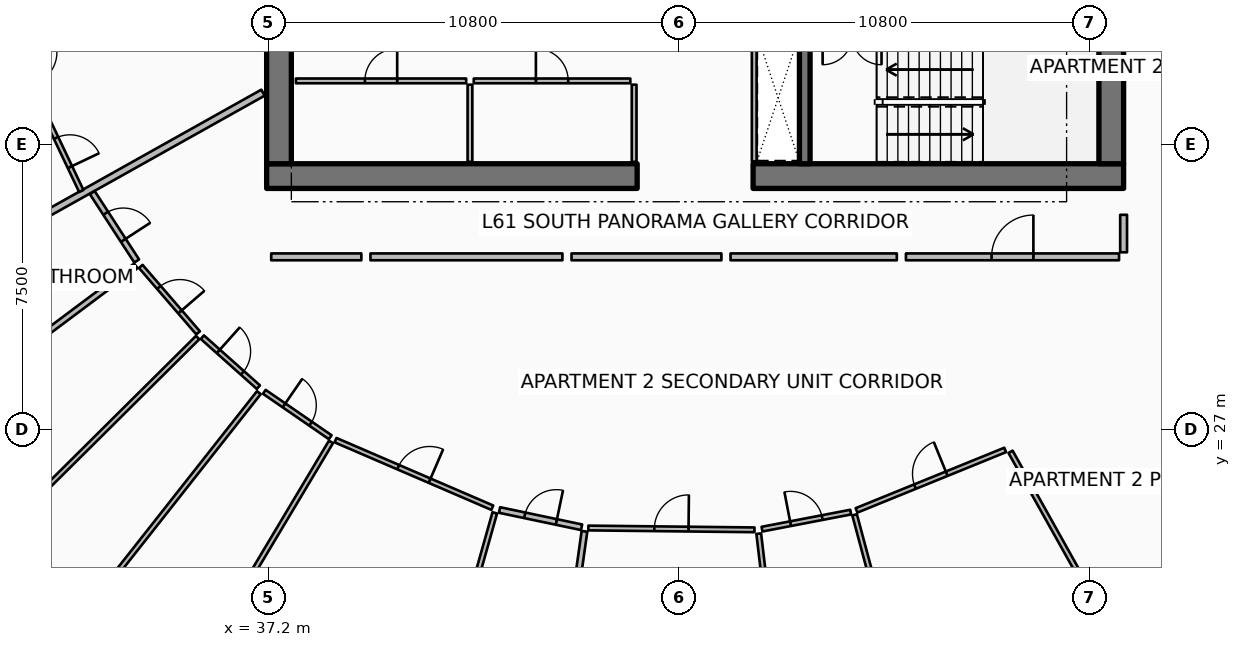
"""IFC4 building model, lengths in metres.
Left out: names, types, materials, properties, quantities, classifications, styles, units other than length and angle.
Written with IfcOpenShell. Run it as: python <this file> out.ifc"""

import sys

from ifc_helpers import new_model, si_unit, direction, frame, frame_2d, origin, place, context, subcontext, project, spatial, rectangle, extrude, element, fill, save


model = new_model("IFC4")
c1 = context("Model", 3, precision=1e-05, world=origin(), true_north=direction((0.0, 1.0)))
c2 = subcontext(c1, "Body", "Model", "MODEL_VIEW")
j1 = project(units=[si_unit("LENGTHUNIT", "METRE"), si_unit("PLANEANGLEUNIT", "RADIAN")], contexts=[c1])
p1 = place(None, origin())
s1 = spatial("IfcSite", under=j1, at=p1, CompositionType="ELEMENT")
p2 = place(p1, origin())
s2 = spatial("IfcBuilding", under=s1, at=p2, CompositionType="ELEMENT")
p3 = place(p2, frame((0.0, 0.0, 244.4)))
s3 = spatial("IfcBuildingStorey", under=s2, at=p3, CompositionType="ELEMENT", Elevation=244.4)
for number, where, z_axis, x_axis in (
    (1, (37.15, 33.675, 0.0), (0.0, 0.0, 1.0), (1.0, 0.0, 0.0)),
    (2, (49.95, 33.675, 0.0), (0.0, 0.0, 1.0), (1.0, 0.0, 0.0)),
):
    element("IfcWall", number, at=place(p3, frame(where, z_axis=z_axis, x_axis=x_axis)), inside=s3, PredefinedType="SHEAR", context=c2, shape_type="SweptSolid", body=[
        extrude(rectangle(XDim=9.75, YDim=0.65, at=frame_2d((4.875, 0.0))), origin(), (0.0, 0.0, 1.0), 3.85),
    ])
for number, where, z_axis, x_axis in (
    (3, (37.475, 34.0, 0.0), (0.0, 0.0, 1.0), (0.0, 1.0, 0.0)),
    (4, (59.375, 34.0, 0.0), (0.0, 0.0, 1.0), (0.0, 1.0, 0.0)),
):
    element("IfcWall", number, at=place(p3, frame(where, z_axis=z_axis, x_axis=x_axis)), inside=s3, PredefinedType="SHEAR", context=c2, shape_type="SweptSolid", body=[
        extrude(rectangle(XDim=16.0, YDim=0.65, at=frame_2d((8.0, 0.0))), origin(), (0.0, 0.0, 1.0), 3.85),
    ])
p4 = place(p3, frame((51.31, 34.0, 0.0), z_axis=(0.0, 0.0, 1.0), x_axis=(0.0, 1.0, 0.0)))
e5 = element("IfcWall", 5, at=p4, inside=s3, PredefinedType="SHEAR", context=c2, shape_type="SweptSolid", body=[
    extrude(rectangle(XDim=3.5, YDim=0.28, at=frame_2d((1.75, 0.0))), origin(), (0.0, 0.0, 1.0), 3.85),
])
for number, where, z_axis, x_axis in (
    (6, (46.82, 34.05, 0.0), (0.0, 0.0, 1.0), (0.0, 1.0, 0.0)),
    (7, (42.5, 34.05, 0.0), (0.0, 0.0, 1.0), (0.0, 1.0, 0.0)),
):
    element("IfcWall", number, at=place(p3, frame(where, z_axis=z_axis, x_axis=x_axis)), inside=s3, PredefinedType="PARTITIONING", context=c2, shape_type="SweptSolid", body=[
        extrude(rectangle(XDim=2.03, YDim=0.125, at=frame_2d((1.015, 0.0))), origin(), (0.0, 0.0, 1.0), 3.03),
    ])
p5 = place(p3, frame((37.92, 36.18, 0.0), z_axis=(0.0, 0.0, 1.0), x_axis=(1.0, 0.0, 0.0)))
e8 = element("IfcWall", 8, at=p5, inside=s3, PredefinedType="PARTITIONING", context=c2, shape_type="SweptSolid", body=[
    extrude(rectangle(XDim=4.48, YDim=0.125, at=frame_2d((2.24, 0.0))), origin(), (0.0, 0.0, 1.0), 3.03),
])
p6 = place(p5, frame((1.815, 0.0, 0.0)))
e9 = element("IfcOpeningElement", 9, at=p6, cuts=e8, PredefinedType="OPENING", context=c2, shape_type="SweptSolid", body=[
    extrude(rectangle(XDim=0.85, YDim=2.06, at=frame_2d((0.425, 1.03))), frame((0.0, 0.073, 0.0), z_axis=(0.0, -1.0, 0.0), x_axis=(1.0, 0.0, 0.0)), (0.0, 0.0, 1.0), 0.145),
])
p7 = place(p3, frame((42.6, 36.18, 0.0), z_axis=(0.0, 0.0, 1.0), x_axis=(1.0, 0.0, 0.0)))
e10 = element("IfcWall", 10, at=p7, inside=s3, PredefinedType="PARTITIONING", context=c2, shape_type="SweptSolid", body=[
    extrude(rectangle(XDim=4.12, YDim=0.125, at=frame_2d((2.06, 0.0))), origin(), (0.0, 0.0, 1.0), 3.03),
])
p8 = place(p7, frame((1.635, 0.0, 0.0)))
e11 = element("IfcOpeningElement", 11, at=p8, cuts=e10, PredefinedType="OPENING", context=c2, shape_type="SweptSolid", body=[
    extrude(rectangle(XDim=0.85, YDim=2.06, at=frame_2d((0.425, 1.03))), frame((0.0, 0.073, 0.0), z_axis=(0.0, -1.0, 0.0), x_axis=(1.0, 0.0, 0.0)), (0.0, 0.0, 1.0), 0.145),
])
p9 = place(p3, frame((49.98, 34.06, 0.0), z_axis=(0.0, 0.0, 1.0), x_axis=(0.0, 1.0, 0.0)))
e12 = element("IfcWall", 12, at=p9, inside=s3, PredefinedType="PARTITIONING", context=c2, shape_type="SweptSolid", body=[
    extrude(rectangle(XDim=3.4, YDim=0.125, at=frame_2d((1.7, 0.0))), origin(), (0.0, 0.0, 1.0), 3.03),
])
p10 = place(p3, frame((37.054, 35.87, 0.0), z_axis=(0.0, 0.0, 1.0), x_axis=(-0.872490186067, -0.488631635506, 0.0)))
e13 = element("IfcWall", 13, at=p10, inside=s3, PredefinedType="PARTITIONING", context=c2, shape_type="SweptSolid", body=[
    extrude(rectangle(XDim=17.884, YDim=0.18, at=frame_2d((8.942, 0.0))), origin(), (0.0, 0.0, 1.0), 2.957),
])
p11 = place(p3, frame((31.31, 35.306, 0.0), z_axis=(0.0, 0.0, 1.0), x_axis=(0.429468098594, -0.903082029657, 0.0)))
e14 = element("IfcWall", 14, at=p11, inside=s3, PredefinedType="PARTITIONING", context=c2, shape_type="SweptSolid", body=[
    extrude(rectangle(XDim=2.24, YDim=0.125, at=frame_2d((1.12, 0.0))), origin(), (0.0, 0.0, 1.0), 2.957),
])
p12 = place(p11, frame((0.695, 0.0, 0.0)))
e15 = element("IfcOpeningElement", 15, at=p12, cuts=e14, PredefinedType="OPENING", context=c2, shape_type="SweptSolid", body=[
    extrude(rectangle(XDim=0.85, YDim=2.06, at=frame_2d((0.425, 1.03))), frame((0.0, 0.073, 0.0), z_axis=(0.0, -1.0, 0.0), x_axis=(1.0, 0.0, 0.0)), (0.0, 0.0, 1.0), 0.145),
])
p13 = place(p3, frame((53.972, 31.55, 0.0), z_axis=(0.0, 0.0, 1.0), x_axis=(1.0, 0.0, 0.0)))
e16 = element("IfcWall", 16, at=p13, inside=s3, PredefinedType="PARTITIONING", context=c2, shape_type="SweptSolid", body=[
    extrude(rectangle(XDim=5.608, YDim=0.18, at=frame_2d((2.804, 0.0))), origin(), (0.0, 0.0, 1.0), 2.957),
])
p14 = place(p13, frame((2.254, 0.0, 0.0)))
e17 = element("IfcOpeningElement", 17, at=p14, cuts=e16, PredefinedType="OPENING", context=c2, shape_type="SweptSolid", body=[
    extrude(rectangle(XDim=1.1, YDim=2.1, at=frame_2d((0.55, 1.05))), frame((0.0, 0.1, 0.0), z_axis=(0.0, -1.0, 0.0), x_axis=(1.0, 0.0, 0.0)), (0.0, 0.0, 1.0), 0.2),
])
p15 = place(p3, frame((59.7, 31.67, 0.0), z_axis=(0.0, 0.0, 1.0), x_axis=(0.0, 1.0, 0.0)))
e18 = element("IfcWall", 18, at=p15, inside=s3, PredefinedType="PARTITIONING", context=c2, shape_type="SweptSolid", body=[
    extrude(rectangle(XDim=0.987, YDim=0.18, at=frame_2d((0.493, 0.0))), origin(), (0.0, 0.0, 1.0), 2.957),
])
p16 = place(p3, frame((37.27, 31.55, 0.0), z_axis=(0.0, 0.0, 1.0), x_axis=(1.0, 0.0, 0.0)))
e19 = element("IfcWall", 19, at=p16, inside=s3, PredefinedType="PARTITIONING", context=c2, shape_type="SweptSolid", body=[
    extrude(rectangle(XDim=2.372, YDim=0.18, at=frame_2d((1.186, 0.0))), origin(), (0.0, 0.0, 1.0), 2.957),
])
p17 = place(p3, frame((32.562, 33.24, 0.0), z_axis=(0.0, 0.0, 1.0), x_axis=(0.544888302375, -0.838508639154, 0.0)))
e20 = element("IfcWall", 20, at=p17, inside=s3, PredefinedType="PARTITIONING", context=c2, shape_type="SweptSolid", body=[
    extrude(rectangle(XDim=2.144, YDim=0.15, at=frame_2d((1.072, 0.0))), origin(), (0.0, 0.0, 1.0), 2.957),
])
p18 = place(p17, frame((0.647, 0.0, 0.0)))
e21 = element("IfcOpeningElement", 21, at=p18, cuts=e20, PredefinedType="OPENING", context=c2, shape_type="SweptSolid", body=[
    extrude(rectangle(XDim=0.85, YDim=2.06, at=frame_2d((0.425, 1.03))), frame((0.0, 0.085, 0.0), z_axis=(0.0, -1.0, 0.0), x_axis=(1.0, 0.0, 0.0)), (0.0, 0.0, 1.0), 0.17),
])
p19 = place(p3, frame((33.707, 31.312, 0.0), z_axis=(0.0, 0.0, 1.0), x_axis=(-0.800889069655, -0.598812740435, 0.0)))
e22 = element("IfcWall", 22, at=p19, inside=s3, PredefinedType="PARTITIONING", context=c2, shape_type="SweptSolid", body=[
    extrude(rectangle(XDim=3.72, YDim=0.15, at=frame_2d((1.86, 0.0))), origin(), (0.0, 0.0, 1.0), 3.03),
])
p20 = place(p3, frame((35.335, 29.426, 0.0), z_axis=(0.0, 0.0, 1.0), x_axis=(-0.709660425086, -0.704543881576, 0.0)))
e23 = element("IfcWall", 23, at=p20, inside=s3, PredefinedType="PARTITIONING", context=c2, shape_type="SweptSolid", body=[
    extrude(rectangle(XDim=11.738, YDim=0.125, at=frame_2d((5.869, 0.0))), origin(), (0.0, 0.0, 1.0), 3.03),
])
p21 = place(p3, frame((33.838, 31.298, 0.0), z_axis=(0.0, 0.0, 1.0), x_axis=(0.653278423857, -0.757117758954, 0.0)))
e24 = element("IfcWall", 24, at=p21, inside=s3, PredefinedType="PARTITIONING", context=c2, shape_type="SweptSolid", body=[
    extrude(rectangle(XDim=2.309, YDim=0.125, at=frame_2d((1.154, 0.0))), origin(), (0.0, 0.0, 1.0), 3.03),
])
p22 = place(p21, frame((0.729, 0.0, 0.0)))
e25 = element("IfcOpeningElement", 25, at=p22, cuts=e24, PredefinedType="OPENING", context=c2, shape_type="SweptSolid", body=[
    extrude(rectangle(XDim=0.85, YDim=2.06, at=frame_2d((0.425, 1.03))), frame((0.0, 0.073, 0.0), z_axis=(0.0, -1.0, 0.0), x_axis=(1.0, 0.0, 0.0)), (0.0, 0.0, 1.0), 0.145),
])
p23 = place(p3, frame((35.458, 29.436, 0.0), z_axis=(0.0, 0.0, 1.0), x_axis=(0.746255603185, -0.665659503586, 0.0)))
e26 = element("IfcWall", 26, at=p23, inside=s3, PredefinedType="PARTITIONING", context=c2, shape_type="SweptSolid", body=[
    extrude(rectangle(XDim=1.975, YDim=0.125, at=frame_2d((0.988, 0.0))), origin(), (0.0, 0.0, 1.0), 2.957),
])
p24 = place(p23, frame((0.562, 0.0, 0.0)))
e27 = element("IfcOpeningElement", 27, at=p24, cuts=e26, PredefinedType="OPENING", context=c2, shape_type="SweptSolid", body=[
    extrude(rectangle(XDim=0.85, YDim=2.06, at=frame_2d((0.425, 1.03))), frame((0.0, 0.073, 0.0), z_axis=(0.0, -1.0, 0.0), x_axis=(1.0, 0.0, 0.0)), (0.0, 0.0, 1.0), 0.145),
])
p25 = place(p3, frame((39.882, 31.55, 0.0), z_axis=(0.0, 0.0, 1.0), x_axis=(1.0, 0.0, 0.0)))
e28 = element("IfcWall", 28, at=p25, inside=s3, PredefinedType="PARTITIONING", context=c2, shape_type="SweptSolid", body=[
    extrude(rectangle(XDim=5.051, YDim=0.18, at=frame_2d((2.525, 0.0))), origin(), (0.0, 0.0, 1.0), 2.957),
])
p26 = place(p3, frame((36.945, 27.977, 0.0), z_axis=(0.0, 0.0, 1.0), x_axis=(-0.619096573209, -0.785314862358, 0.0)))
e29 = element("IfcWall", 29, at=p26, inside=s3, PredefinedType="PARTITIONING", context=c2, shape_type="SweptSolid", body=[
    extrude(rectangle(XDim=11.739, YDim=0.125, at=frame_2d((5.869, 0.0))), origin(), (0.0, 0.0, 1.0), 2.957),
])
p27 = place(p3, frame((38.843, 26.681, 0.0), z_axis=(0.0, 0.0, 1.0), x_axis=(-0.513080899873, -0.858340253154, 0.0)))
e30 = element("IfcWall", 30, at=p27, inside=s3, PredefinedType="PARTITIONING", context=c2, shape_type="SweptSolid", body=[
    extrude(rectangle(XDim=10.282, YDim=0.125, at=frame_2d((5.141, 0.0))), origin(), (0.0, 0.0, 1.0), 3.03),
])
p28 = place(p3, frame((37.089, 27.998, 0.0), z_axis=(0.0, 0.0, 1.0), x_axis=(0.823534084839, -0.567266790063, 0.0)))
e31 = element("IfcWall", 31, at=p28, inside=s3, PredefinedType="PARTITIONING", context=c2, shape_type="SweptSolid", body=[
    extrude(rectangle(XDim=2.105, YDim=0.125, at=frame_2d((1.053, 0.0))), origin(), (0.0, 0.0, 1.0), 2.957),
])
p29 = place(p28, frame((0.628, 0.0, 0.0)))
e32 = element("IfcOpeningElement", 32, at=p29, cuts=e31, PredefinedType="OPENING", context=c2, shape_type="SweptSolid", body=[
    extrude(rectangle(XDim=0.85, YDim=2.06, at=frame_2d((0.425, 1.03))), frame((0.0, 0.073, 0.0), z_axis=(0.0, -1.0, 0.0), x_axis=(1.0, 0.0, 0.0)), (0.0, 0.0, 1.0), 0.145),
])
p30 = place(p3, frame((38.962, 26.727, 0.0), z_axis=(0.0, 0.0, 1.0), x_axis=(0.918384361194, -0.395689480671, 0.0)))
e33 = element("IfcWall", 33, at=p30, inside=s3, PredefinedType="PARTITIONING", context=c2, shape_type="SweptSolid", body=[
    extrude(rectangle(XDim=4.492, YDim=0.125, at=frame_2d((2.246, 0.0))), origin(), (0.0, 0.0, 1.0), 2.957),
])
p31 = place(p30, frame((1.796, 0.0, 0.0)))
e34 = element("IfcOpeningElement", 34, at=p31, cuts=e33, PredefinedType="OPENING", context=c2, shape_type="SweptSolid", body=[
    extrude(rectangle(XDim=0.9, YDim=2.08, at=frame_2d((0.45, 1.04))), frame((0.0, 0.073, 0.0), z_axis=(0.0, -1.0, 0.0), x_axis=(1.0, 0.0, 0.0)), (0.0, 0.0, 1.0), 0.145),
])
p32 = place(p3, frame((45.173, 31.55, 0.0), z_axis=(0.0, 0.0, 1.0), x_axis=(1.0, 0.0, 0.0)))
e35 = element("IfcWall", 35, at=p32, inside=s3, PredefinedType="PARTITIONING", context=c2, shape_type="SweptSolid", body=[
    extrude(rectangle(XDim=3.944, YDim=0.18, at=frame_2d((1.972, 0.0))), origin(), (0.0, 0.0, 1.0), 2.957),
])
p33 = place(p3, frame((43.153, 24.813, 0.0), z_axis=(0.0, 0.0, 1.0), x_axis=(-0.271434117828, -0.96245702225, 0.0)))
e36 = element("IfcWall", 36, at=p33, inside=s3, PredefinedType="PARTITIONING", context=c2, shape_type="SweptSolid", body=[
    extrude(rectangle(XDim=9.128, YDim=0.125, at=frame_2d((4.564, 0.0))), origin(), (0.0, 0.0, 1.0), 2.957),
])
p34 = place(p3, frame((43.278, 24.889, 0.0), z_axis=(0.0, 0.0, 1.0), x_axis=(0.978579118273, -0.205871098701, 0.0)))
e37 = element("IfcWall", 37, at=p34, inside=s3, PredefinedType="PARTITIONING", context=c2, shape_type="SweptSolid", body=[
    extrude(rectangle(XDim=2.207, YDim=0.15, at=frame_2d((1.104, 0.0))), origin(), (0.0, 0.0, 1.0), 2.957),
])
p35 = place(p34, frame((0.678, 0.0, 0.0)))
e38 = element("IfcOpeningElement", 38, at=p35, cuts=e37, PredefinedType="OPENING", context=c2, shape_type="SweptSolid", body=[
    extrude(rectangle(XDim=0.85, YDim=2.06, at=frame_2d((0.425, 1.03))), frame((0.0, 0.085, 0.0), z_axis=(0.0, -1.0, 0.0), x_axis=(1.0, 0.0, 0.0)), (0.0, 0.0, 1.0), 0.17),
])
p36 = place(p3, frame((45.513, 24.327, 0.0), z_axis=(0.0, 0.0, 1.0), x_axis=(-0.139367219172, -0.990240767804, 0.0)))
e39 = element("IfcWall", 39, at=p36, inside=s3, PredefinedType="PARTITIONING", context=c2, shape_type="SweptSolid", body=[
    extrude(rectangle(XDim=4.46, YDim=0.15, at=frame_2d((2.23, 0.0))), origin(), (0.0, 0.0, 1.0), 3.03),
])
p37 = place(p3, frame((45.615, 24.415, 0.0), z_axis=(0.0, 0.0, 1.0), x_axis=(0.999939484605, -0.011001233021, 0.0)))
e40 = element("IfcWall", 40, at=p37, inside=s3, PredefinedType="PARTITIONING", context=c2, shape_type="SweptSolid", body=[
    extrude(rectangle(XDim=4.372, YDim=0.125, at=frame_2d((2.186, 0.0))), origin(), (0.0, 0.0, 1.0), 3.03),
])
p38 = place(p37, frame((1.736, 0.0, 0.0)))
e41 = element("IfcOpeningElement", 41, at=p38, cuts=e40, PredefinedType="OPENING", context=c2, shape_type="SweptSolid", body=[
    extrude(rectangle(XDim=0.9, YDim=2.08, at=frame_2d((0.45, 1.04))), frame((0.0, 0.073, 0.0), z_axis=(0.0, -1.0, 0.0), x_axis=(1.0, 0.0, 0.0)), (0.0, 0.0, 1.0), 0.145),
])
p39 = place(p3, frame((49.357, 31.55, 0.0), z_axis=(0.0, 0.0, 1.0), x_axis=(1.0, 0.0, 0.0)))
e42 = element("IfcWall", 42, at=p39, inside=s3, PredefinedType="PARTITIONING", context=c2, shape_type="SweptSolid", body=[
    extrude(rectangle(XDim=4.376, YDim=0.18, at=frame_2d((2.188, 0.0))), origin(), (0.0, 0.0, 1.0), 2.957),
])
p40 = place(p3, frame((50.099, 24.267, 0.0), z_axis=(0.0, 0.0, 1.0), x_axis=(0.117541429875, -0.993067979679, 0.0)))
e43 = element("IfcWall", 43, at=p40, inside=s3, PredefinedType="PARTITIONING", context=c2, shape_type="SweptSolid", body=[
    extrude(rectangle(XDim=6.838, YDim=0.125, at=frame_2d((3.419, 0.0))), origin(), (0.0, 0.0, 1.0), 2.957),
])
p41 = place(p3, frame((56.725, 26.42, 0.0), z_axis=(0.0, 0.0, 1.0), x_axis=(0.488624332812, -0.872494275846, 0.0)))
e44 = element("IfcWall", 44, at=p41, inside=s3, PredefinedType="PARTITIONING", context=c2, shape_type="SweptSolid", body=[
    extrude(rectangle(XDim=6.738, YDim=0.125, at=frame_2d((3.369, 0.0))), origin(), (0.0, 0.0, 1.0), 2.957),
])
p42 = place(p3, frame((52.621, 24.762, 0.0), z_axis=(0.0, 0.0, 1.0), x_axis=(0.258970884365, -0.96588512829, 0.0)))
e45 = element("IfcWall", 45, at=p42, inside=s3, PredefinedType="PARTITIONING", context=c2, shape_type="SweptSolid", body=[
    extrude(rectangle(XDim=6.306, YDim=0.125, at=frame_2d((3.153, 0.0))), origin(), (0.0, 0.0, 1.0), 3.03),
])
p43 = place(p3, frame((50.185, 24.385, 0.0), z_axis=(0.0, 0.0, 1.0), x_axis=(0.982037935844, 0.188683577884, 0.0)))
e46 = element("IfcWall", 46, at=p43, inside=s3, PredefinedType="PARTITIONING", context=c2, shape_type="SweptSolid", body=[
    extrude(rectangle(XDim=2.377, YDim=0.125, at=frame_2d((1.188, 0.0))), origin(), (0.0, 0.0, 1.0), 2.957),
])
p44 = place(p43, frame((0.763, 0.0, 0.0)))
e47 = element("IfcOpeningElement", 47, at=p44, cuts=e46, PredefinedType="OPENING", context=c2, shape_type="SweptSolid", body=[
    extrude(rectangle(XDim=0.85, YDim=2.06, at=frame_2d((0.425, 1.03))), frame((0.0, 0.073, 0.0), z_axis=(0.0, -1.0, 0.0), x_axis=(1.0, 0.0, 0.0)), (0.0, 0.0, 1.0), 0.145),
])
p45 = place(p3, frame((52.672, 24.879, 0.0), z_axis=(0.0, 0.0, 1.0), x_axis=(0.926344303187, 0.376677888857, 0.0)))
e48 = element("IfcWall", 48, at=p45, inside=s3, PredefinedType="PARTITIONING", context=c2, shape_type="SweptSolid", body=[
    extrude(rectangle(XDim=4.223, YDim=0.125, at=frame_2d((2.111, 0.0))), origin(), (0.0, 0.0, 1.0), 2.957),
])
p46 = place(p45, frame((1.661, 0.0, 0.0)))
e49 = element("IfcOpeningElement", 49, at=p46, cuts=e48, PredefinedType="OPENING", context=c2, shape_type="SweptSolid", body=[
    extrude(rectangle(XDim=0.9, YDim=2.08, at=frame_2d((0.45, 1.04))), frame((0.0, 0.073, 0.0), z_axis=(0.0, -1.0, 0.0), x_axis=(1.0, 0.0, 0.0)), (0.0, 0.0, 1.0), 0.145),
])
p47 = place(p6, origin())
e50 = element("IfcDoor", 50, at=p47, inside=s3, OperationType="SINGLE_SWING_RIGHT", PredefinedType="DOOR", context=c2, shape_type="SweptSolid", body=[
    extrude(rectangle(XDim=0.85, YDim=2.06, at=frame_2d((0.425, 1.03))), frame((0.0, 0.025, 0.0), z_axis=(0.0, -1.0, 0.0), x_axis=(1.0, 0.0, 0.0)), (0.0, 0.0, 1.0), 0.05),
])
fill(e9, e50)
p48 = place(p8, origin())
e51 = element("IfcDoor", 51, at=p48, inside=s3, OperationType="SINGLE_SWING_LEFT", PredefinedType="DOOR", context=c2, shape_type="SweptSolid", body=[
    extrude(rectangle(XDim=0.85, YDim=2.06, at=frame_2d((0.425, 1.03))), frame((0.0, 0.025, 0.0), z_axis=(0.0, -1.0, 0.0), x_axis=(1.0, 0.0, 0.0)), (0.0, 0.0, 1.0), 0.05),
])
fill(e11, e51)
p49 = place(p12, origin())
e52 = element("IfcDoor", 52, at=p49, inside=s3, OperationType="SINGLE_SWING_RIGHT", PredefinedType="DOOR", context=c2, shape_type="SweptSolid", body=[
    extrude(rectangle(XDim=0.85, YDim=2.06, at=frame_2d((0.425, 1.03))), frame((0.0, 0.025, 0.0), z_axis=(0.0, -1.0, 0.0), x_axis=(1.0, 0.0, 0.0)), (0.0, 0.0, 1.0), 0.05),
])
fill(e15, e52)
p50 = place(p14, origin())
e53 = element("IfcDoor", 53, at=p50, inside=s3, OperationType="SINGLE_SWING_RIGHT", PredefinedType="DOOR", context=c2, shape_type="SweptSolid", body=[
    extrude(rectangle(XDim=1.1, YDim=2.1, at=frame_2d((0.55, 1.05))), frame((0.0, 0.025, 0.0), z_axis=(0.0, -1.0, 0.0), x_axis=(1.0, 0.0, 0.0)), (0.0, 0.0, 1.0), 0.05),
])
fill(e17, e53)
p51 = place(p18, origin())
e54 = element("IfcDoor", 54, at=p51, inside=s3, OperationType="SINGLE_SWING_RIGHT", PredefinedType="DOOR", context=c2, shape_type="SweptSolid", body=[
    extrude(rectangle(XDim=0.85, YDim=2.06, at=frame_2d((0.425, 1.03))), frame((0.0, 0.025, 0.0), z_axis=(0.0, -1.0, 0.0), x_axis=(1.0, 0.0, 0.0)), (0.0, 0.0, 1.0), 0.05),
])
fill(e21, e54)
p52 = place(p22, origin())
e55 = element("IfcDoor", 55, at=p52, inside=s3, OperationType="SINGLE_SWING_RIGHT", PredefinedType="DOOR", context=c2, shape_type="SweptSolid", body=[
    extrude(rectangle(XDim=0.85, YDim=2.06, at=frame_2d((0.425, 1.03))), frame((0.0, 0.025, 0.0), z_axis=(0.0, -1.0, 0.0), x_axis=(1.0, 0.0, 0.0)), (0.0, 0.0, 1.0), 0.05),
])
fill(e25, e55)
p53 = place(p24, origin())
e56 = element("IfcDoor", 56, at=p53, inside=s3, OperationType="SINGLE_SWING_LEFT", PredefinedType="DOOR", context=c2, shape_type="SweptSolid", body=[
    extrude(rectangle(XDim=0.85, YDim=2.06, at=frame_2d((0.425, 1.03))), frame((0.0, 0.025, 0.0), z_axis=(0.0, -1.0, 0.0), x_axis=(1.0, 0.0, 0.0)), (0.0, 0.0, 1.0), 0.05),
])
fill(e27, e56)
p54 = place(p29, origin())
e57 = element("IfcDoor", 57, at=p54, inside=s3, OperationType="SINGLE_SWING_LEFT", PredefinedType="DOOR", context=c2, shape_type="SweptSolid", body=[
    extrude(rectangle(XDim=0.85, YDim=2.06, at=frame_2d((0.425, 1.03))), frame((0.0, 0.025, 0.0), z_axis=(0.0, -1.0, 0.0), x_axis=(1.0, 0.0, 0.0)), (0.0, 0.0, 1.0), 0.05),
])
fill(e32, e57)
p55 = place(p31, origin())
e58 = element("IfcDoor", 58, at=p55, inside=s3, OperationType="SINGLE_SWING_RIGHT", PredefinedType="DOOR", context=c2, shape_type="SweptSolid", body=[
    extrude(rectangle(XDim=0.9, YDim=2.08, at=frame_2d((0.45, 1.04))), frame((0.0, 0.025, 0.0), z_axis=(0.0, -1.0, 0.0), x_axis=(1.0, 0.0, 0.0)), (0.0, 0.0, 1.0), 0.05),
])
fill(e34, e58)
p56 = place(p35, origin())
e59 = element("IfcDoor", 59, at=p56, inside=s3, OperationType="SINGLE_SWING_RIGHT", PredefinedType="DOOR", context=c2, shape_type="SweptSolid", body=[
    extrude(rectangle(XDim=0.85, YDim=2.06, at=frame_2d((0.425, 1.03))), frame((0.0, 0.025, 0.0), z_axis=(0.0, -1.0, 0.0), x_axis=(1.0, 0.0, 0.0)), (0.0, 0.0, 1.0), 0.05),
])
fill(e38, e59)
p57 = place(p38, origin())
e60 = element("IfcDoor", 60, at=p57, inside=s3, OperationType="SINGLE_SWING_RIGHT", PredefinedType="DOOR", context=c2, shape_type="SweptSolid", body=[
    extrude(rectangle(XDim=0.9, YDim=2.08, at=frame_2d((0.45, 1.04))), frame((0.0, 0.025, 0.0), z_axis=(0.0, -1.0, 0.0), x_axis=(1.0, 0.0, 0.0)), (0.0, 0.0, 1.0), 0.05),
])
fill(e41, e60)
p58 = place(p44, origin())
e61 = element("IfcDoor", 61, at=p58, inside=s3, OperationType="SINGLE_SWING_LEFT", PredefinedType="DOOR", context=c2, shape_type="SweptSolid", body=[
    extrude(rectangle(XDim=0.85, YDim=2.06, at=frame_2d((0.425, 1.03))), frame((0.0, 0.025, 0.0), z_axis=(0.0, -1.0, 0.0), x_axis=(1.0, 0.0, 0.0)), (0.0, 0.0, 1.0), 0.05),
])
fill(e47, e61)
p59 = place(p46, origin())
e62 = element("IfcDoor", 62, at=p59, inside=s3, OperationType="SINGLE_SWING_RIGHT", PredefinedType="DOOR", context=c2, shape_type="SweptSolid", body=[
    extrude(rectangle(XDim=0.9, YDim=2.08, at=frame_2d((0.45, 1.04))), frame((0.0, 0.025, 0.0), z_axis=(0.0, -1.0, 0.0), x_axis=(1.0, 0.0, 0.0)), (0.0, 0.0, 1.0), 0.05),
])
fill(e49, e62)
save(model, sys.argv[1])
